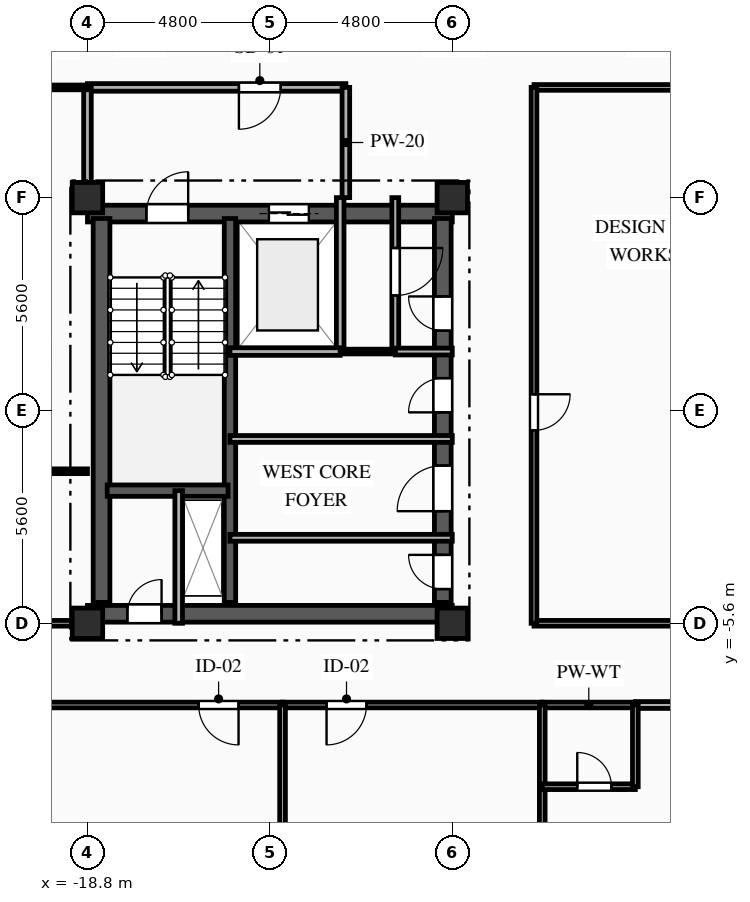
"""IFC4 building model, lengths in metres.
Left out: names, types, materials, properties, quantities, classifications, styles, units other than length and angle.
Written with IfcOpenShell. Run it as: python <this file> out.ifc"""

import sys

from ifc_helpers import new_model, si_unit, direction, frame, frame_2d, origin, origin_2d, place, context, subcontext, project, spatial, rectangle, extrude, element, fill, save


model = new_model("IFC4")
c1 = context("Model", 3, precision=1e-05, world=origin(), true_north=direction((0.0, 1.0)))
c2 = subcontext(c1, "Body", "Model", "MODEL_VIEW")
j1 = project(units=[si_unit("LENGTHUNIT", "METRE"), si_unit("PLANEANGLEUNIT", "RADIAN")], contexts=[c1])
p1 = place(None, origin())
s1 = spatial("IfcSite", under=j1, at=p1, CompositionType="ELEMENT")
p2 = place(p1, origin())
s2 = spatial("IfcBuilding", under=s1, at=p2, CompositionType="ELEMENT")
p3 = place(p2, frame((0.0, 0.0, 238.35)))
s3 = spatial("IfcBuildingStorey", under=s2, at=p3, CompositionType="ELEMENT", Elevation=238.35)
for number, where, z_axis, x_axis in (
    (1, (-18.8, -5.6, 0.0), (0.0, 0.0, 1.0), (1.0, 0.0, 0.0)),
    (2, (-18.8, 5.6, 0.0), (0.0, 0.0, 1.0), (1.0, 0.0, 0.0)),
    (3, (-9.2, -5.6, 0.0), (0.0, 0.0, 1.0), (1.0, 0.0, 0.0)),
    (4, (-9.2, 5.6, 0.0), (0.0, 0.0, 1.0), (1.0, 0.0, 0.0)),
):
    element("IfcColumn", number, at=place(p3, frame(where, z_axis=z_axis, x_axis=x_axis)), inside=s3, PredefinedType="COLUMN", context=c2, shape_type="SweptSolid", body=[
        extrude(rectangle(XDim=0.8, YDim=0.8, at=origin_2d()), origin(), (0.0, 0.0, 1.0), 3.35),
    ])
p4 = place(p3, frame((-18.8, 5.18, 0.0), z_axis=(0.0, 0.0, 1.0), x_axis=(1.0, 0.0, 0.0)))
e5 = element("IfcWall", 5, at=p4, inside=s3, PredefinedType="SHEAR", context=c2, shape_type="SweptSolid", body=[
    extrude(rectangle(XDim=9.6, YDim=0.44, at=frame_2d((4.8, 0.0))), origin(), (0.0, 0.0, 1.0), 3.04),
])
p5 = place(p4, frame((1.55, 0.0, 0.0)))
e6 = element("IfcOpeningElement", 6, at=p5, cuts=e5, PredefinedType="OPENING", context=c2, shape_type="SweptSolid", body=[
    extrude(rectangle(XDim=1.1, YDim=2.15, at=frame_2d((0.55, 1.075))), frame((0.0, 0.23, 0.0), z_axis=(0.0, -1.0, 0.0), x_axis=(1.0, 0.0, 0.0)), (0.0, 0.0, 1.0), 0.46),
])
p6 = place(p4, frame((4.775, 0.0, 0.0)))
e7 = element("IfcOpeningElement", 7, at=p6, cuts=e5, PredefinedType="OPENING", context=c2, shape_type="SweptSolid", body=[
    extrude(rectangle(XDim=1.05, YDim=2.1, at=frame_2d((0.525, 1.05))), frame((0.0, 0.23, 0.0), z_axis=(0.0, -1.0, 0.0), x_axis=(1.0, 0.0, 0.0)), (0.0, 0.0, 1.0), 0.46),
])
p7 = place(p3, frame((-18.8, -5.35, 0.0), z_axis=(0.0, 0.0, 1.0), x_axis=(1.0, 0.0, 0.0)))
e8 = element("IfcWall", 8, at=p7, inside=s3, PredefinedType="SHEAR", context=c2, shape_type="SweptSolid", body=[
    extrude(rectangle(XDim=9.6, YDim=0.44, at=frame_2d((4.8, 0.0))), origin(), (0.0, 0.0, 1.0), 3.04),
])
p8 = place(p7, frame((1.05, 0.0, 0.0)))
e9 = element("IfcOpeningElement", 9, at=p8, cuts=e8, PredefinedType="OPENING", context=c2, shape_type="SweptSolid", body=[
    extrude(rectangle(XDim=0.9, YDim=2.1, at=frame_2d((0.45, 1.05))), frame((0.0, 0.23, 0.0), z_axis=(0.0, -1.0, 0.0), x_axis=(1.0, 0.0, 0.0)), (0.0, 0.0, 1.0), 0.46),
])
p9 = place(p3, frame((-18.43, -5.05, 0.0), z_axis=(0.0, 0.0, 1.0), x_axis=(0.0, 1.0, 0.0)))
e10 = element("IfcWall", 10, at=p9, inside=s3, PredefinedType="SHEAR", context=c2, shape_type="SweptSolid", body=[
    extrude(rectangle(XDim=10.1, YDim=0.44, at=frame_2d((5.05, 0.0))), origin(), (0.0, 0.0, 1.0), 3.04),
])
p10 = place(p3, frame((-9.45, -5.05, 0.0), z_axis=(0.0, 0.0, 1.0), x_axis=(0.0, 1.0, 0.0)))
e11 = element("IfcWall", 11, at=p10, inside=s3, PredefinedType="SHEAR", context=c2, shape_type="SweptSolid", body=[
    extrude(rectangle(XDim=10.1, YDim=0.44, at=frame_2d((5.05, 0.0))), origin(), (0.0, 0.0, 1.0), 3.04),
])
p11 = place(p10, frame((7.15, 0.0, 0.0)))
e12 = element("IfcOpeningElement", 12, at=p11, cuts=e11, PredefinedType="OPENING", context=c2, shape_type="SweptSolid", body=[
    extrude(rectangle(XDim=0.9, YDim=2.1, at=frame_2d((0.45, 1.05))), frame((0.0, 0.23, 0.0), z_axis=(0.0, -1.0, 0.0), x_axis=(1.0, 0.0, 0.0)), (0.0, 0.0, 1.0), 0.46),
])
p12 = place(p10, frame((2.4, 0.0, 0.0)))
e13 = element("IfcOpeningElement", 13, at=p12, cuts=e11, PredefinedType="OPENING", context=c2, shape_type="SweptSolid", body=[
    extrude(rectangle(XDim=1.2, YDim=2.15, at=frame_2d((0.6, 1.075))), frame((0.0, 0.23, 0.0), z_axis=(0.0, -1.0, 0.0), x_axis=(1.0, 0.0, 0.0)), (0.0, 0.0, 1.0), 0.46),
])
p13 = place(p10, frame((0.35, 0.0, 0.0)))
e14 = element("IfcOpeningElement", 14, at=p13, cuts=e11, PredefinedType="OPENING", context=c2, shape_type="SweptSolid", body=[
    extrude(rectangle(XDim=0.9, YDim=2.1, at=frame_2d((0.45, 1.05))), frame((0.0, 0.23, 0.0), z_axis=(0.0, -1.0, 0.0), x_axis=(1.0, 0.0, 0.0)), (0.0, 0.0, 1.0), 0.46),
])
p14 = place(p10, frame((5.0, 0.0, 0.0)))
e15 = element("IfcOpeningElement", 15, at=p14, cuts=e11, PredefinedType="OPENING", context=c2, shape_type="SweptSolid", body=[
    extrude(rectangle(XDim=0.9, YDim=2.1, at=frame_2d((0.45, 1.05))), frame((0.0, 0.23, 0.0), z_axis=(0.0, -1.0, 0.0), x_axis=(1.0, 0.0, 0.0)), (0.0, 0.0, 1.0), 0.46),
])
p15 = place(p3, frame((-15.05, -5.05, 0.0), z_axis=(0.0, 0.0, 1.0), x_axis=(0.0, 1.0, 0.0)))
e16 = element("IfcWall", 16, at=p15, inside=s3, PredefinedType="SHEAR", context=c2, shape_type="SweptSolid", body=[
    extrude(rectangle(XDim=10.1, YDim=0.3, at=frame_2d((5.05, 0.0))), origin(), (0.0, 0.0, 1.0), 3.04),
])
p16 = place(p3, frame((-18.28, -2.11, 0.0), z_axis=(0.0, 0.0, 1.0), x_axis=(1.0, 0.0, 0.0)))
e17 = element("IfcWall", 17, at=p16, inside=s3, PredefinedType="SHEAR", context=c2, shape_type="SweptSolid", body=[
    extrude(rectangle(XDim=3.18, YDim=0.3, at=frame_2d((1.59, 0.0))), origin(), (0.0, 0.0, 1.0), 3.04),
])
p17 = place(p3, frame((-16.4, -5.6, 0.0), z_axis=(0.0, 0.0, 1.0), x_axis=(0.0, 1.0, 0.0)))
e18 = element("IfcWall", 18, at=p17, inside=s3, PredefinedType="PARTITIONING", context=c2, shape_type="SweptSolid", body=[
    extrude(rectangle(XDim=3.49, YDim=0.2, at=frame_2d((1.745, 0.0))), origin(), (0.0, 0.0, 1.0), 3.04),
])
p18 = place(p3, frame((-12.15, 1.55, 0.0), z_axis=(0.0, 0.0, 1.0), x_axis=(0.0, 1.0, 0.0)))
e19 = element("IfcWall", 19, at=p18, inside=s3, PredefinedType="PARTITIONING", context=c2, shape_type="SweptSolid", body=[
    extrude(rectangle(XDim=4.05, YDim=0.2, at=frame_2d((2.025, 0.0))), origin(), (0.0, 0.0, 1.0), 3.04),
])
p19 = place(p3, frame((-12.0, 8.5, 0.0), z_axis=(0.0, 0.0, 1.0), x_axis=(-1.0, 0.0, 0.0)))
e20 = element("IfcWall", 20, at=p19, inside=s3, PredefinedType="PARTITIONING", context=c2, shape_type="SweptSolid", body=[
    extrude(rectangle(XDim=6.8, YDim=0.2, at=frame_2d((3.4, 0.0))), origin(), (0.0, 0.0, 1.0), 3.04),
])
p20 = place(p19, frame((1.715, 0.0, 0.0)))
e21 = element("IfcOpeningElement", 21, at=p20, cuts=e20, PredefinedType="OPENING", context=c2, shape_type="SweptSolid", body=[
    extrude(rectangle(XDim=1.1, YDim=2.15, at=frame_2d((0.55, 1.075))), frame((0.0, 0.11, 0.0), z_axis=(0.0, -1.0, 0.0), x_axis=(1.0, 0.0, 0.0)), (0.0, 0.0, 1.0), 0.22),
])
p21 = place(p3, frame((-12.0, 5.6, 0.0), z_axis=(0.0, 0.0, 1.0), x_axis=(0.0, 1.0, 0.0)))
e22 = element("IfcWall", 22, at=p21, inside=s3, PredefinedType="PARTITIONING", context=c2, shape_type="SweptSolid", body=[
    extrude(rectangle(XDim=2.9, YDim=0.2, at=frame_2d((1.45, 0.0))), origin(), (0.0, 0.0, 1.0), 3.04),
])
p22 = place(p3, frame((-18.8, 8.5, 0.0), z_axis=(0.0, 0.0, 1.0), x_axis=(0.0, -1.0, 0.0)))
e23 = element("IfcWall", 23, at=p22, inside=s3, PredefinedType="PARTITIONING", context=c2, shape_type="SweptSolid", body=[
    extrude(rectangle(XDim=2.9, YDim=0.2, at=frame_2d((1.45, 0.0))), origin(), (0.0, 0.0, 1.0), 2.665),
])
p23 = place(p3, frame((-10.7, 5.6, 0.0), z_axis=(0.0, 0.0, 1.0), x_axis=(0.0, -1.0, 0.0)))
e24 = element("IfcWall", 24, at=p23, inside=s3, PredefinedType="PARTITIONING", context=c2, shape_type="SweptSolid", body=[
    extrude(rectangle(XDim=4.05, YDim=0.18, at=frame_2d((2.025, 0.0))), origin(), (0.0, 0.0, 1.0), 3.04),
])
p24 = place(p23, frame((1.325, 0.0, 0.0)))
e25 = element("IfcOpeningElement", 25, at=p24, cuts=e24, PredefinedType="OPENING", context=c2, shape_type="SweptSolid", body=[
    extrude(rectangle(XDim=1.25, YDim=2.2, at=frame_2d((0.625, 1.1))), frame((0.0, 0.1, 0.0), z_axis=(0.0, -1.0, 0.0), x_axis=(1.0, 0.0, 0.0)), (0.0, 0.0, 1.0), 0.2),
])
p25 = place(p3, frame((-10.7, 1.55, 0.0), z_axis=(0.0, 0.0, 1.0), x_axis=(1.0, 0.0, 0.0)))
e26 = element("IfcWall", 26, at=p25, inside=s3, PredefinedType="PARTITIONING", context=c2, shape_type="SweptSolid", body=[
    extrude(rectangle(XDim=1.5, YDim=0.18, at=frame_2d((0.75, 0.0))), origin(), (0.0, 0.0, 1.0), 3.04),
])
p26 = place(p3, frame((-12.15, 1.55, 0.0), z_axis=(0.0, 0.0, 1.0), x_axis=(1.0, 0.0, 0.0)))
e27 = element("IfcWall", 27, at=p26, inside=s3, PredefinedType="PARTITIONING", context=c2, shape_type="SweptSolid", body=[
    extrude(rectangle(XDim=1.45, YDim=0.125, at=frame_2d((0.725, 0.0))), origin(), (0.0, 0.0, 1.0), 3.04),
])
p27 = place(p3, frame((-15.05, -3.35, 0.0), z_axis=(0.0, 0.0, 1.0), x_axis=(1.0, 0.0, 0.0)))
e28 = element("IfcWall", 28, at=p27, inside=s3, PredefinedType="PARTITIONING", context=c2, shape_type="SweptSolid", body=[
    extrude(rectangle(XDim=5.85, YDim=0.18, at=frame_2d((2.925, 0.0))), origin(), (0.0, 0.0, 1.0), 2.755),
])
p28 = place(p3, frame((-9.2, -0.75, 0.0), z_axis=(0.0, 0.0, 1.0), x_axis=(-1.0, 0.0, 0.0)))
e29 = element("IfcWall", 29, at=p28, inside=s3, PredefinedType="PARTITIONING", context=c2, shape_type="SweptSolid", body=[
    extrude(rectangle(XDim=5.85, YDim=0.18, at=frame_2d((2.925, 0.0))), origin(), (0.0, 0.0, 1.0), 3.04),
])
p29 = place(p3, frame((-18.8, 8.5, 0.0), z_axis=(0.0, 0.0, 1.0), x_axis=(-1.0, 0.0, 0.0)))
e30 = element("IfcWall", 30, at=p29, inside=s3, PredefinedType="PARTITIONING", context=c2, shape_type="SweptSolid", body=[
    extrude(rectangle(XDim=1.7, YDim=0.125, at=frame_2d((0.85, 0.0))), origin(), (0.0, 0.0, 1.0), 3.04),
])
p30 = place(p3, frame((0.0, 8.5, 0.0), z_axis=(0.0, 0.0, 1.0), x_axis=(-1.0, 0.0, 0.0)))
e31 = element("IfcWall", 31, at=p30, inside=s3, PredefinedType="PARTITIONING", context=c2, shape_type="SweptSolid", body=[
    extrude(rectangle(XDim=7.05, YDim=0.15, at=frame_2d((3.525, 0.0))), origin(), (0.0, 0.0, 1.0), 3.04),
])
p31 = place(p3, frame((-20.5, -5.6, 0.0), z_axis=(0.0, 0.0, 1.0), x_axis=(1.0, 0.0, 0.0)))
e32 = element("IfcWall", 32, at=p31, inside=s3, PredefinedType="PARTITIONING", context=c2, shape_type="SweptSolid", body=[
    extrude(rectangle(XDim=1.7, YDim=0.15, at=frame_2d((0.85, 0.0))), origin(), (0.0, 0.0, 1.0), 3.04),
])
p32 = place(p3, frame((-13.667, -7.75, 0.0), z_axis=(0.0, 0.0, 1.0), x_axis=(-1.0, 0.0, 0.0)))
e33 = element("IfcWall", 33, at=p32, inside=s3, PredefinedType="PARTITIONING", context=c2, shape_type="SweptSolid", body=[
    extrude(rectangle(XDim=6.833, YDim=0.15, at=frame_2d((3.417, 0.0))), origin(), (0.0, 0.0, 1.0), 3.04),
])
p33 = place(p32, frame((1.158, 0.0, 0.0)))
e34 = element("IfcOpeningElement", 34, at=p33, cuts=e33, PredefinedType="OPENING", context=c2, shape_type="SweptSolid", body=[
    extrude(rectangle(XDim=1.05, YDim=2.15, at=frame_2d((0.525, 1.075))), frame((0.0, 0.085, 0.0), z_axis=(0.0, -1.0, 0.0), x_axis=(1.0, 0.0, 0.0)), (0.0, 0.0, 1.0), 0.17),
])
p34 = place(p3, frame((-6.833, -7.75, 0.0), z_axis=(0.0, 0.0, 1.0), x_axis=(-1.0, 0.0, 0.0)))
e35 = element("IfcWall", 35, at=p34, inside=s3, PredefinedType="PARTITIONING", context=c2, shape_type="SweptSolid", body=[
    extrude(rectangle(XDim=6.833, YDim=0.15, at=frame_2d((3.417, 0.0))), origin(), (0.0, 0.0, 1.0), 3.04),
])
p35 = place(p34, frame((4.625, 0.0, 0.0)))
e36 = element("IfcOpeningElement", 36, at=p35, cuts=e35, PredefinedType="OPENING", context=c2, shape_type="SweptSolid", body=[
    extrude(rectangle(XDim=1.05, YDim=2.15, at=frame_2d((0.525, 1.075))), frame((0.0, 0.085, 0.0), z_axis=(0.0, -1.0, 0.0), x_axis=(1.0, 0.0, 0.0)), (0.0, 0.0, 1.0), 0.17),
])
p36 = place(p3, frame((0.0, -7.75, 0.0), z_axis=(0.0, 0.0, 1.0), x_axis=(-1.0, 0.0, 0.0)))
e37 = element("IfcWall", 37, at=p36, inside=s3, PredefinedType="PARTITIONING", context=c2, shape_type="SweptSolid", body=[
    extrude(rectangle(XDim=4.383, YDim=0.18, at=frame_2d((2.191, 0.0))), origin(), (0.0, 0.0, 1.0), 3.04),
])
p37 = place(p3, frame((-4.383, -7.75, 0.0), z_axis=(0.0, 0.0, 1.0), x_axis=(-1.0, 0.0, 0.0)))
e38 = element("IfcWall", 38, at=p37, inside=s3, PredefinedType="PLUMBINGWALL", context=c2, shape_type="SweptSolid", body=[
    extrude(rectangle(XDim=2.45, YDim=0.15, at=frame_2d((1.225, 0.0))), origin(), (0.0, 0.0, 1.0), 3.04),
])
p38 = place(p3, frame((-7.05, -5.6, 0.0), z_axis=(0.0, 0.0, 1.0), x_axis=(1.0, 0.0, 0.0)))
e39 = element("IfcWall", 39, at=p38, inside=s3, PredefinedType="PARTITIONING", context=c2, shape_type="SweptSolid", body=[
    extrude(rectangle(XDim=7.05, YDim=0.15, at=frame_2d((3.525, 0.0))), origin(), (0.0, 0.0, 1.0), 2.525),
])
p39 = place(p3, frame((-7.05, 8.5, 0.0), z_axis=(0.0, 0.0, 1.0), x_axis=(0.0, -1.0, 0.0)))
e40 = element("IfcWall", 40, at=p39, inside=s3, PredefinedType="PARTITIONING", context=c2, shape_type="SweptSolid", body=[
    extrude(rectangle(XDim=14.1, YDim=0.15, at=frame_2d((7.05, 0.0))), origin(), (0.0, 0.0, 1.0), 3.04),
])
p40 = place(p39, frame((8.074, 0.0, 0.0)))
e41 = element("IfcOpeningElement", 41, at=p40, cuts=e40, PredefinedType="OPENING", context=c2, shape_type="SweptSolid", body=[
    extrude(rectangle(XDim=0.95, YDim=2.1, at=frame_2d((0.475, 1.05))), frame((0.0, 0.085, 0.0), z_axis=(0.0, -1.0, 0.0), x_axis=(1.0, 0.0, 0.0)), (0.0, 0.0, 1.0), 0.17),
])
p41 = place(p3, frame((-24.0, -1.6, 0.0), z_axis=(0.0, 0.0, 1.0), x_axis=(1.0, 0.0, 0.0)))
e42 = element("IfcWall", 42, at=p41, inside=s3, PredefinedType="PARTITIONING", context=c2, shape_type="SweptSolid", body=[
    extrude(rectangle(XDim=5.2, YDim=0.125, at=frame_2d((2.6, 0.0))), origin(), (0.0, 0.0, 1.0), 3.04),
])
p42 = place(p3, frame((-13.667, -7.75, 0.0), z_axis=(0.0, 0.0, 1.0), x_axis=(0.0, -1.0, 0.0)))
e43 = element("IfcWall", 43, at=p42, inside=s3, PredefinedType="PARTITIONING", context=c2, shape_type="SweptSolid", body=[
    extrude(rectangle(XDim=10.65, YDim=0.15, at=frame_2d((5.325, 0.0))), origin(), (0.0, 0.0, 1.0), 3.04),
])
p43 = place(p3, frame((-6.833, -9.9, 0.0), z_axis=(0.0, 0.0, 1.0), x_axis=(0.0, -1.0, 0.0)))
e44 = element("IfcWall", 44, at=p43, inside=s3, PredefinedType="PARTITIONING", context=c2, shape_type="SweptSolid", body=[
    extrude(rectangle(XDim=8.5, YDim=0.15, at=frame_2d((4.25, 0.0))), origin(), (0.0, 0.0, 1.0), 2.665),
])
p44 = place(p3, frame((-6.833, -7.75, 0.0), z_axis=(0.0, 0.0, 1.0), x_axis=(0.0, -1.0, 0.0)))
e45 = element("IfcWall", 45, at=p44, inside=s3, PredefinedType="PLUMBINGWALL", context=c2, shape_type="SweptSolid", body=[
    extrude(rectangle(XDim=2.15, YDim=0.15, at=frame_2d((1.075, 0.0))), origin(), (0.0, 0.0, 1.0), 3.04),
])
p45 = place(p3, frame((-6.833, -9.9, 0.0), z_axis=(0.0, 0.0, 1.0), x_axis=(1.0, 0.0, 0.0)))
e46 = element("IfcWall", 46, at=p45, inside=s3, PredefinedType="PLUMBINGWALL", context=c2, shape_type="SweptSolid", body=[
    extrude(rectangle(XDim=2.45, YDim=0.15, at=frame_2d((1.225, 0.0))), origin(), (0.0, 0.0, 1.0), 3.04),
])
p46 = place(p45, frame((0.921, 0.0, 0.0)))
e47 = element("IfcOpeningElement", 47, at=p46, cuts=e46, PredefinedType="OPENING", context=c2, shape_type="SweptSolid", body=[
    extrude(rectangle(XDim=0.9, YDim=2.1, at=frame_2d((0.45, 1.05))), frame((0.0, 0.085, 0.0), z_axis=(0.0, -1.0, 0.0), x_axis=(1.0, 0.0, 0.0)), (0.0, 0.0, 1.0), 0.17),
])
p47 = place(p3, frame((-4.383, -9.9, 0.0), z_axis=(0.0, 0.0, 1.0), x_axis=(0.0, 1.0, 0.0)))
e48 = element("IfcWall", 48, at=p47, inside=s3, PredefinedType="PLUMBINGWALL", context=c2, shape_type="SweptSolid", body=[
    extrude(rectangle(XDim=2.15, YDim=0.15, at=frame_2d((1.075, 0.0))), origin(), (0.0, 0.0, 1.0), 3.04),
])
p48 = place(p3, frame((-15.05, 1.55, 0.0), z_axis=(0.0, 0.0, 1.0), x_axis=(1.0, 0.0, 0.0)))
e49 = element("IfcWall", 49, at=p48, inside=s3, PredefinedType="PARTITIONING", context=c2, shape_type="SweptSolid", body=[
    extrude(rectangle(XDim=2.9, YDim=0.2, at=frame_2d((1.45, 0.0))), origin(), (0.0, 0.0, 1.0), 3.04),
])
p49 = place(p5, origin())
e50 = element("IfcDoor", 50, at=p49, inside=s3, OperationType="SINGLE_SWING_RIGHT", PredefinedType="DOOR", context=c2, shape_type="SweptSolid", body=[
    extrude(rectangle(XDim=1.1, YDim=2.15, at=frame_2d((0.55, 1.075))), frame((0.0, 0.025, 0.0), z_axis=(0.0, -1.0, 0.0), x_axis=(1.0, 0.0, 0.0)), (0.0, 0.0, 1.0), 0.05),
])
fill(e6, e50)
p50 = place(p6, origin())
e51 = element("IfcDoor", 51, at=p50, inside=s3, OperationType="DOUBLE_DOOR_SLIDING", PredefinedType="DOOR", context=c2, shape_type="SweptSolid", body=[
    extrude(rectangle(XDim=1.05, YDim=2.1, at=frame_2d((0.525, 1.05))), frame((0.0, 0.025, 0.0), z_axis=(0.0, -1.0, 0.0), x_axis=(1.0, 0.0, 0.0)), (0.0, 0.0, 1.0), 0.05),
])
fill(e7, e51)
p51 = place(p8, origin())
e52 = element("IfcDoor", 52, at=p51, inside=s3, OperationType="SINGLE_SWING_RIGHT", PredefinedType="DOOR", context=c2, shape_type="SweptSolid", body=[
    extrude(rectangle(XDim=0.9, YDim=2.1, at=frame_2d((0.45, 1.05))), frame((0.0, 0.025, 0.0), z_axis=(0.0, -1.0, 0.0), x_axis=(1.0, 0.0, 0.0)), (0.0, 0.0, 1.0), 0.05),
])
fill(e9, e52)
p52 = place(p20, origin())
e53 = element("IfcDoor", 53, at=p52, inside=s3, OperationType="SINGLE_SWING_RIGHT", PredefinedType="DOOR", context=c2, shape_type="SweptSolid", body=[
    extrude(rectangle(XDim=1.1, YDim=2.15, at=frame_2d((0.55, 1.075))), frame((0.0, 0.025, 0.0), z_axis=(0.0, -1.0, 0.0), x_axis=(1.0, 0.0, 0.0)), (0.0, 0.0, 1.0), 0.05),
])
fill(e21, e53)
p53 = place(p24, origin())
e54 = element("IfcDoor", 54, at=p53, inside=s3, OperationType="SINGLE_SWING_LEFT", PredefinedType="DOOR", context=c2, shape_type="SweptSolid", body=[
    extrude(rectangle(XDim=1.25, YDim=2.2, at=frame_2d((0.625, 1.1))), frame((0.0, 0.025, 0.0), z_axis=(0.0, -1.0, 0.0), x_axis=(1.0, 0.0, 0.0)), (0.0, 0.0, 1.0), 0.05),
])
fill(e25, e54)
p54 = place(p11, origin())
e55 = element("IfcDoor", 55, at=p54, inside=s3, OperationType="SINGLE_SWING_RIGHT", PredefinedType="DOOR", context=c2, shape_type="SweptSolid", body=[
    extrude(rectangle(XDim=0.9, YDim=2.1, at=frame_2d((0.45, 1.05))), frame((0.0, 0.025, 0.0), z_axis=(0.0, -1.0, 0.0), x_axis=(1.0, 0.0, 0.0)), (0.0, 0.0, 1.0), 0.05),
])
fill(e12, e55)
p55 = place(p12, origin())
e56 = element("IfcDoor", 56, at=p55, inside=s3, OperationType="SINGLE_SWING_LEFT", PredefinedType="DOOR", context=c2, shape_type="SweptSolid", body=[
    extrude(rectangle(XDim=1.2, YDim=2.15, at=frame_2d((0.6, 1.075))), frame((0.0, 0.025, 0.0), z_axis=(0.0, -1.0, 0.0), x_axis=(1.0, 0.0, 0.0)), (0.0, 0.0, 1.0), 0.05),
])
fill(e13, e56)
p56 = place(p13, origin())
e57 = element("IfcDoor", 57, at=p56, inside=s3, OperationType="SINGLE_SWING_RIGHT", PredefinedType="DOOR", context=c2, shape_type="SweptSolid", body=[
    extrude(rectangle(XDim=0.9, YDim=2.1, at=frame_2d((0.45, 1.05))), frame((0.0, 0.025, 0.0), z_axis=(0.0, -1.0, 0.0), x_axis=(1.0, 0.0, 0.0)), (0.0, 0.0, 1.0), 0.05),
])
fill(e14, e57)
p57 = place(p14, origin())
e58 = element("IfcDoor", 58, at=p57, inside=s3, OperationType="SINGLE_SWING_LEFT", PredefinedType="DOOR", context=c2, shape_type="SweptSolid", body=[
    extrude(rectangle(XDim=0.9, YDim=2.1, at=frame_2d((0.45, 1.05))), frame((0.0, 0.025, 0.0), z_axis=(0.0, -1.0, 0.0), x_axis=(1.0, 0.0, 0.0)), (0.0, 0.0, 1.0), 0.05),
])
fill(e15, e58)
p58 = place(p33, origin())
e59 = element("IfcDoor", 59, at=p58, inside=s3, OperationType="SINGLE_SWING_LEFT", PredefinedType="DOOR", context=c2, shape_type="SweptSolid", body=[
    extrude(rectangle(XDim=1.05, YDim=2.15, at=frame_2d((0.525, 1.075))), frame((0.0, 0.025, 0.0), z_axis=(0.0, -1.0, 0.0), x_axis=(1.0, 0.0, 0.0)), (0.0, 0.0, 1.0), 0.05),
])
fill(e34, e59)
p59 = place(p35, origin())
e60 = element("IfcDoor", 60, at=p59, inside=s3, OperationType="SINGLE_SWING_RIGHT", PredefinedType="DOOR", context=c2, shape_type="SweptSolid", body=[
    extrude(rectangle(XDim=1.05, YDim=2.15, at=frame_2d((0.525, 1.075))), frame((0.0, 0.025, 0.0), z_axis=(0.0, -1.0, 0.0), x_axis=(1.0, 0.0, 0.0)), (0.0, 0.0, 1.0), 0.05),
])
fill(e36, e60)
p60 = place(p40, origin())
e61 = element("IfcDoor", 61, at=p60, inside=s3, OperationType="SINGLE_SWING_LEFT", PredefinedType="DOOR", context=c2, shape_type="SweptSolid", body=[
    extrude(rectangle(XDim=0.95, YDim=2.1, at=frame_2d((0.475, 1.05))), frame((0.0, 0.025, 0.0), z_axis=(0.0, -1.0, 0.0), x_axis=(1.0, 0.0, 0.0)), (0.0, 0.0, 1.0), 0.05),
])
fill(e41, e61)
p61 = place(p46, origin())
e62 = element("IfcDoor", 62, at=p61, inside=s3, OperationType="SINGLE_SWING_LEFT", PredefinedType="DOOR", context=c2, shape_type="SweptSolid", body=[
    extrude(rectangle(XDim=0.9, YDim=2.1, at=frame_2d((0.45, 1.05))), frame((0.0, 0.025, 0.0), z_axis=(0.0, -1.0, 0.0), x_axis=(1.0, 0.0, 0.0)), (0.0, 0.0, 1.0), 0.05),
])
fill(e47, e62)
save(model, sys.argv[1])
